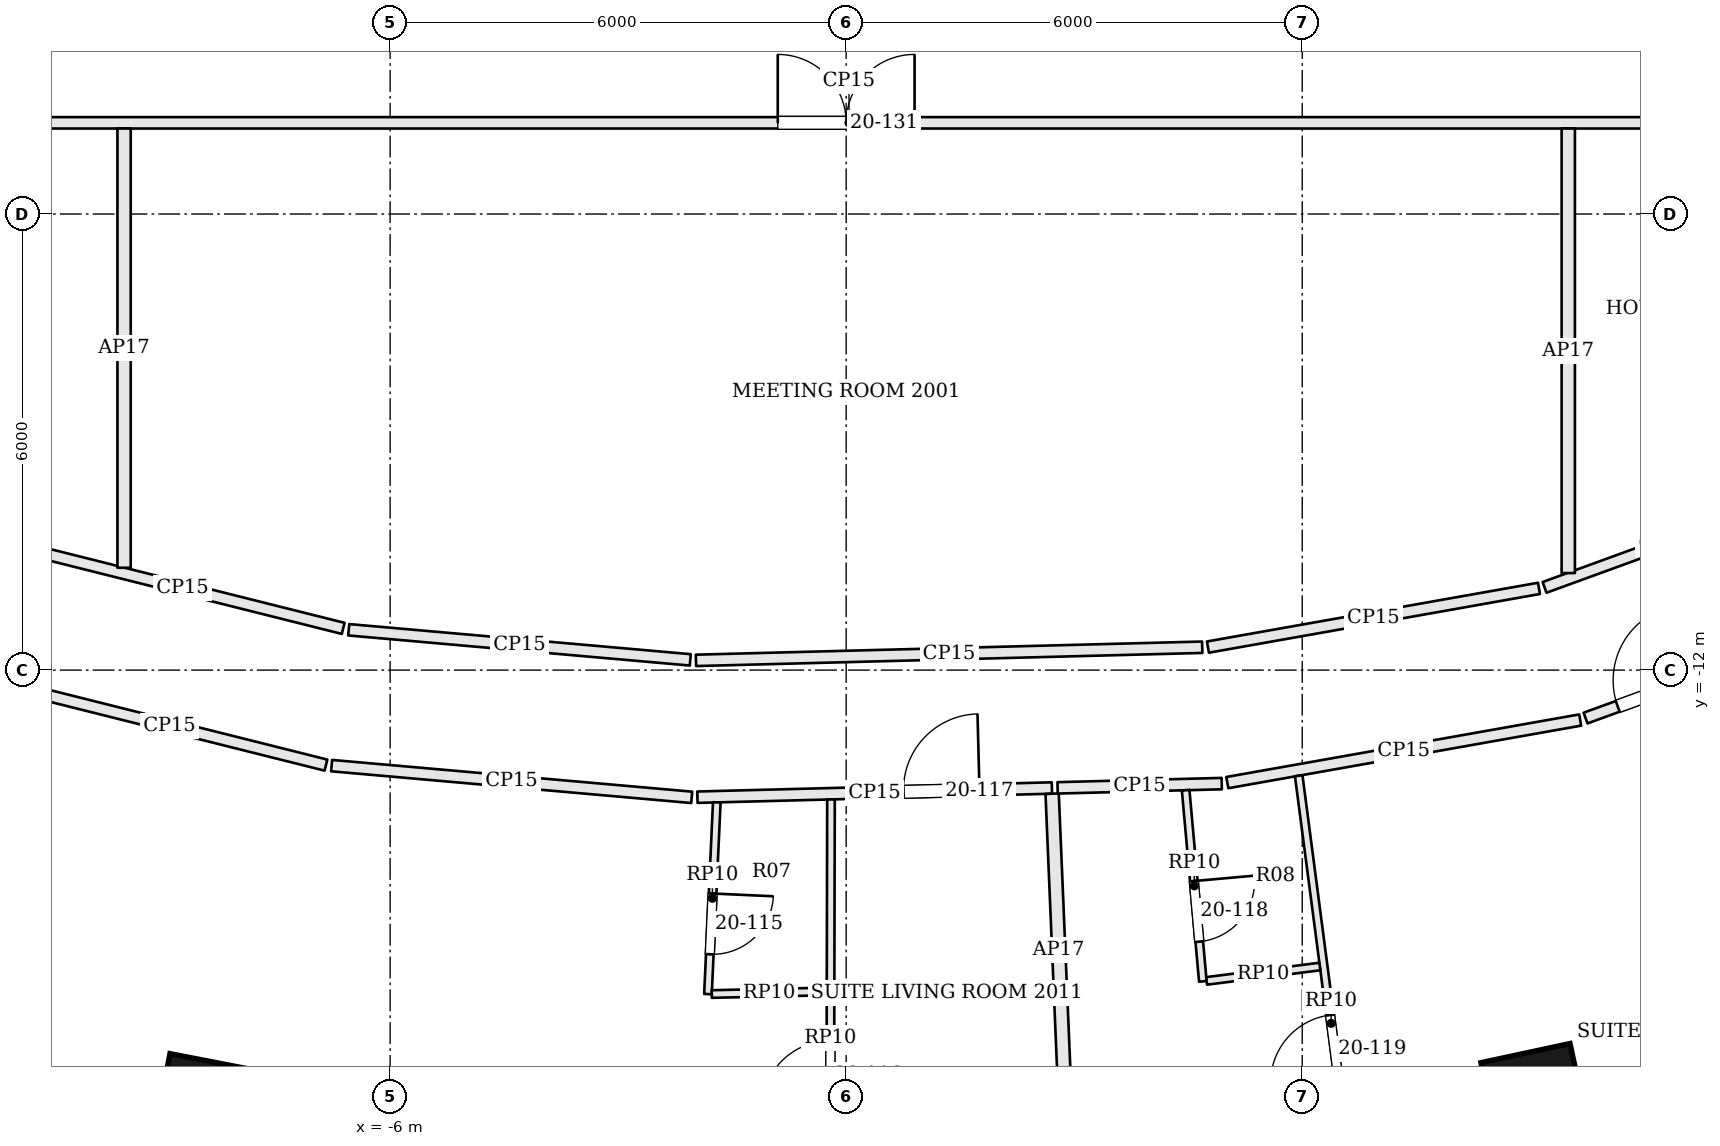
"""IFC4 building model, lengths in metres.
Left out: names, types, materials, properties, quantities, classifications, styles, units other than length and angle.
Written with IfcOpenShell. Run it as: python <this file> out.ifc"""

import sys

from ifc_helpers import new_model, si_unit, direction, frame, frame_2d, origin, origin_2d, place, context, subcontext, project, spatial, rectangle, extrude, element, fill, save


model = new_model("IFC4")
c1 = context("Model", 3, precision=1e-05, world=origin(), true_north=direction((0.0, 1.0)))
c2 = subcontext(c1, "Body", "Model", "MODEL_VIEW")
j1 = project(units=[si_unit("LENGTHUNIT", "METRE"), si_unit("PLANEANGLEUNIT", "RADIAN")], contexts=[c1])
p1 = place(None, origin())
s1 = spatial("IfcSite", under=j1, at=p1, CompositionType="ELEMENT")
p2 = place(p1, origin())
s2 = spatial("IfcBuilding", under=s1, at=p2, CompositionType="ELEMENT")
p3 = place(p2, frame((0.0, 0.0, 88.8)))
s3 = spatial("IfcBuildingStorey", under=s2, at=p3, CompositionType="ELEMENT", Elevation=88.8)
for number, where, z_axis, x_axis in (
    (1, (-8.422, -17.749, 0.0), (0.0, 0.0, 1.0), (0.982, -0.191, 0.0)),
    (2, (9.063, -17.625, 0.0), (0.0, 0.0, 1.0), (0.978, 0.21, 0.0)),
):
    element("IfcColumn", number, at=place(p3, frame(where, z_axis=z_axis, x_axis=x_axis)), inside=s3, PredefinedType="COLUMN", context=c2, shape_type="SweptSolid", body=[
        extrude(rectangle(XDim=1.2, YDim=1.2, at=origin_2d()), origin(), (0.0, 0.0, 1.0), 3.6),
    ])
p4 = place(p3, frame((-10.961, -12.218, 0.0), z_axis=(0.0, 0.0, 1.0), x_axis=(0.969990045386, -0.243144631551, 0.0)))
e3 = element("IfcWall", 3, at=p4, inside=s3, PredefinedType="PARTITIONING", context=c2, shape_type="SweptSolid", body=[
    extrude(rectangle(XDim=4.244, YDim=0.15, at=frame_2d((2.122, 0.0))), origin(), (0.0, 0.0, 1.0), 2.784),
])
p5 = place(p3, frame((-6.77, -13.257, 0.0), z_axis=(0.0, 0.0, 1.0), x_axis=(0.996139758015, -0.08778144737, 0.0)))
e4 = element("IfcWall", 4, at=p5, inside=s3, PredefinedType="PARTITIONING", context=c2, shape_type="SweptSolid", body=[
    extrude(rectangle(XDim=4.756, YDim=0.15, at=frame_2d((2.378, 0.0))), origin(), (0.0, 0.0, 1.0), 2.784),
])
p6 = place(p3, frame((-1.957, -13.672, 0.0), z_axis=(0.0, 0.0, 1.0), x_axis=(0.999664413823, 0.025904820691, 0.0)))
e5 = element("IfcWall", 5, at=p6, inside=s3, PredefinedType="PARTITIONING", context=c2, shape_type="SweptSolid", body=[
    extrude(rectangle(XDim=4.665, YDim=0.15, at=frame_2d((2.333, 0.0))), origin(), (0.0, 0.0, 1.0), 2.784),
])
p7 = place(p6, frame((2.712, 0.0, 0.0)))
e6 = element("IfcOpeningElement", 6, at=p7, cuts=e5, PredefinedType="OPENING", context=c2, shape_type="SweptSolid", body=[
    extrude(rectangle(XDim=1.0, YDim=2.1, at=frame_2d((0.5, 1.05))), frame((0.0, 0.085, 0.0), z_axis=(0.0, -1.0, 0.0), x_axis=(1.0, 0.0, 0.0)), (0.0, 0.0, 1.0), 0.17),
])
p8 = place(p3, frame((2.882, -17.732, 0.0), z_axis=(0.0, 0.0, 1.0), x_axis=(-0.042001196053, 0.999117560415, 0.0)))
e7 = element("IfcWall", 7, at=p8, inside=s3, PredefinedType="PARTITIONING", context=c2, shape_type="SweptSolid", body=[
    extrude(rectangle(XDim=4.11, YDim=0.175, at=frame_2d((2.055, 0.0))), origin(), (0.0, 0.0, 1.0), 2.784),
])
p9 = place(p3, frame((2.781, -13.549, 0.0), z_axis=(0.0, 0.0, 1.0), x_axis=(0.999665013714, 0.025881660615, 0.0)))
e8 = element("IfcWall", 8, at=p9, inside=s3, PredefinedType="PARTITIONING", context=c2, shape_type="SweptSolid", body=[
    extrude(rectangle(XDim=2.16, YDim=0.15, at=frame_2d((1.08, 0.0))), origin(), (0.0, 0.0, 1.0), 2.784),
])
p10 = place(p3, frame((5.015, -13.48, 0.0), z_axis=(0.0, 0.0, 1.0), x_axis=(0.984637772103, 0.174609443467, 0.0)))
e9 = element("IfcWall", 9, at=p10, inside=s3, PredefinedType="PARTITIONING", context=c2, shape_type="SweptSolid", body=[
    extrude(rectangle(XDim=4.715, YDim=0.15, at=frame_2d((2.357, 0.0))), origin(), (0.0, 0.0, 1.0), 2.784),
])
p11 = place(p3, frame((9.728, -12.631, 0.0), z_axis=(0.0, 0.0, 1.0), x_axis=(0.939626438181, 0.342201923826, 0.0)))
e10 = element("IfcWall", 10, at=p11, inside=s3, PredefinedType="PARTITIONING", context=c2, shape_type="SweptSolid", body=[
    extrude(rectangle(XDim=3.716, YDim=0.15, at=frame_2d((1.858, 0.0))), origin(), (0.0, 0.0, 1.0), 2.784),
])
p12 = place(p11, frame((0.45, 0.0, 0.0)))
e11 = element("IfcOpeningElement", 11, at=p12, cuts=e10, PredefinedType="OPENING", context=c2, shape_type="SweptSolid", body=[
    extrude(rectangle(XDim=1.0, YDim=2.1, at=frame_2d((0.5, 1.05))), frame((0.0, 0.085, 0.0), z_axis=(0.0, -1.0, 0.0), x_axis=(1.0, 0.0, 0.0)), (0.0, 0.0, 1.0), 0.17),
])
p13 = place(p3, frame((12.353, -9.76, 0.0), z_axis=(0.0, 0.0, 1.0), x_axis=(-0.939632450309, -0.342185415127, 0.0)))
e12 = element("IfcWall", 12, at=p13, inside=s3, PredefinedType="PARTITIONING", context=c2, shape_type="SweptSolid", body=[
    extrude(rectangle(XDim=3.368, YDim=0.15, at=frame_2d((1.684, 0.0))), origin(), (0.0, 0.0, 1.0), 2.784),
])
p14 = place(p3, frame((9.115, -10.925, 0.0), z_axis=(0.0, 0.0, 1.0), x_axis=(-0.984632605417, -0.174638576352, 0.0)))
e13 = element("IfcWall", 13, at=p14, inside=s3, PredefinedType="PARTITIONING", context=c2, shape_type="SweptSolid", body=[
    extrude(rectangle(XDim=4.423, YDim=0.15, at=frame_2d((2.211, 0.0))), origin(), (0.0, 0.0, 1.0), 2.784),
])
p15 = place(p3, frame((4.684, -11.699, 0.0), z_axis=(0.0, 0.0, 1.0), x_axis=(-0.999663438204, -0.025942442425, 0.0)))
e14 = element("IfcWall", 14, at=p15, inside=s3, PredefinedType="PARTITIONING", context=c2, shape_type="SweptSolid", body=[
    extrude(rectangle(XDim=6.663, YDim=0.15, at=frame_2d((3.332, 0.0))), origin(), (0.0, 0.0, 1.0), 2.784),
])
p16 = place(p3, frame((-2.051, -11.865, 0.0), z_axis=(0.0, 0.0, 1.0), x_axis=(-0.996139599493, 0.087783246245, 0.0)))
e15 = element("IfcWall", 15, at=p16, inside=s3, PredefinedType="PARTITIONING", context=c2, shape_type="SweptSolid", body=[
    extrude(rectangle(XDim=4.511, YDim=0.15, at=frame_2d((2.255, 0.0))), origin(), (0.0, 0.0, 1.0), 2.784),
])
p17 = place(p3, frame((-6.617, -11.451, 0.0), z_axis=(0.0, 0.0, 1.0), x_axis=(-0.969987441267, 0.243155020069, 0.0)))
e16 = element("IfcWall", 16, at=p17, inside=s3, PredefinedType="PARTITIONING", context=c2, shape_type="SweptSolid", body=[
    extrude(rectangle(XDim=4.359, YDim=0.15, at=frame_2d((2.179, 0.0))), origin(), (0.0, 0.0, 1.0), 2.784),
])
p18 = place(p3, frame((-14.725, -4.8, 0.0), z_axis=(0.0, 0.0, 1.0), x_axis=(1.0, 0.0, 0.0)))
e17 = element("IfcWall", 17, at=p18, inside=s3, PredefinedType="PARTITIONING", context=c2, shape_type="SweptSolid", body=[
    extrude(rectangle(XDim=29.525, YDim=0.15, at=frame_2d((14.763, 0.0))), origin(), (0.0, 0.0, 1.0), 2.784),
])
p19 = place(p18, frame((2.075, 0.0, 0.0)))
e18 = element("IfcOpeningElement", 18, at=p19, cuts=e17, PredefinedType="OPENING", context=c2, shape_type="SweptSolid", body=[
    extrude(rectangle(XDim=1.0, YDim=2.1, at=frame_2d((0.5, 1.05))), frame((0.0, 0.085, 0.0), z_axis=(0.0, -1.0, 0.0), x_axis=(1.0, 0.0, 0.0)), (0.0, 0.0, 1.0), 0.17),
])
p20 = place(p18, frame((13.825, 0.0, 0.0)))
e19 = element("IfcOpeningElement", 19, at=p20, cuts=e17, PredefinedType="OPENING", context=c2, shape_type="SweptSolid", body=[
    extrude(rectangle(XDim=1.8, YDim=2.1, at=frame_2d((0.9, 1.05))), frame((0.0, 0.085, 0.0), z_axis=(0.0, -1.0, 0.0), x_axis=(1.0, 0.0, 0.0)), (0.0, 0.0, 1.0), 0.17),
])
p21 = place(p18, frame((26.525, 0.0, 0.0)))
e20 = element("IfcOpeningElement", 20, at=p21, cuts=e17, PredefinedType="OPENING", context=c2, shape_type="SweptSolid", body=[
    extrude(rectangle(XDim=0.7, YDim=2.1, at=frame_2d((0.35, 1.05))), frame((0.0, 0.085, 0.0), z_axis=(0.0, -1.0, 0.0), x_axis=(1.0, 0.0, 0.0)), (0.0, 0.0, 1.0), 0.17),
])
p22 = place(p3, frame((-0.214, -19.979, 0.0), z_axis=(0.0, 0.0, 1.0), x_axis=(0.002333625165, 0.999997277093, 0.0)))
e21 = element("IfcWall", 21, at=p22, inside=s3, PredefinedType="PARTITIONING", context=c2, shape_type="SweptSolid", body=[
    extrude(rectangle(XDim=6.277, YDim=0.1, at=frame_2d((3.139, 0.0))), origin(), (0.0, 0.0, 1.0), 2.884),
])
p23 = place(p22, frame((2.202, 0.0, 0.0)))
e22 = element("IfcOpeningElement", 22, at=p23, cuts=e21, PredefinedType="OPENING", context=c2, shape_type="SweptSolid", body=[
    extrude(rectangle(XDim=0.9, YDim=2.4, at=frame_2d((0.45, 1.2))), frame((0.0, 0.06, 0.0), z_axis=(0.0, -1.0, 0.0), x_axis=(1.0, 0.0, 0.0)), (0.0, 0.0, 1.0), 0.12),
])
p24 = place(p3, frame((-1.702, -13.74, 0.0), z_axis=(0.0, 0.0, 1.0), x_axis=(-0.045833111847, -0.998949110745, 0.0)))
e23 = element("IfcWall", 23, at=p24, inside=s3, PredefinedType="PARTITIONING", context=c2, shape_type="SweptSolid", body=[
    extrude(rectangle(XDim=2.525, YDim=0.1, at=frame_2d((1.262, 0.0))), origin(), (0.0, 0.0, 1.0), 2.884),
])
p25 = place(p24, frame((1.2, 0.0, 0.0)))
e24 = element("IfcOpeningElement", 24, at=p25, cuts=e23, PredefinedType="OPENING", context=c2, shape_type="SweptSolid", body=[
    extrude(rectangle(XDim=0.8, YDim=2.1, at=frame_2d((0.4, 1.05))), frame((0.0, 0.06, 0.0), z_axis=(0.0, -1.0, 0.0), x_axis=(1.0, 0.0, 0.0)), (0.0, 0.0, 1.0), 0.12),
])
p26 = place(p3, frame((-1.768, -16.262, 0.0), z_axis=(0.0, 0.0, 1.0), x_axis=(0.999748456617, 0.022428185195, 0.0)))
e25 = element("IfcWall", 25, at=p26, inside=s3, PredefinedType="PARTITIONING", context=c2, shape_type="SweptSolid", body=[
    extrude(rectangle(XDim=1.513, YDim=0.1, at=frame_2d((0.757, 0.0))), origin(), (0.0, 0.0, 1.0), 2.884),
])
p27 = place(p3, frame((6.807, -19.905, 0.0), z_axis=(0.0, 0.0, 1.0), x_axis=(-0.129895112789, 0.991527740244, 0.0)))
e26 = element("IfcWall", 26, at=p27, inside=s3, PredefinedType="PARTITIONING", context=c2, shape_type="SweptSolid", body=[
    extrude(rectangle(XDim=6.571, YDim=0.1, at=frame_2d((3.285, 0.0))), origin(), (0.0, 0.0, 1.0), 2.884),
])
p28 = place(p27, frame((2.496, 0.0, 0.0)))
e27 = element("IfcOpeningElement", 27, at=p28, cuts=e26, PredefinedType="OPENING", context=c2, shape_type="SweptSolid", body=[
    extrude(rectangle(XDim=0.9, YDim=2.4, at=frame_2d((0.45, 1.2))), frame((0.0, 0.06, 0.0), z_axis=(0.0, -1.0, 0.0), x_axis=(1.0, 0.0, 0.0)), (0.0, 0.0, 1.0), 0.12),
])
p29 = place(p3, frame((4.466, -13.581, 0.0), z_axis=(0.0, 0.0, 1.0), x_axis=(0.089541778651, -0.995983067063, 0.0)))
e28 = element("IfcWall", 28, at=p29, inside=s3, PredefinedType="PARTITIONING", context=c2, shape_type="SweptSolid", body=[
    extrude(rectangle(XDim=2.525, YDim=0.1, at=frame_2d((1.262, 0.0))), origin(), (0.0, 0.0, 1.0), 2.884),
])
p30 = place(p29, frame((1.2, 0.0, 0.0)))
e29 = element("IfcOpeningElement", 29, at=p30, cuts=e28, PredefinedType="OPENING", context=c2, shape_type="SweptSolid", body=[
    extrude(rectangle(XDim=0.8, YDim=2.1, at=frame_2d((0.4, 1.05))), frame((0.0, 0.06, 0.0), z_axis=(0.0, -1.0, 0.0), x_axis=(1.0, 0.0, 0.0)), (0.0, 0.0, 1.0), 0.12),
])
p31 = place(p3, frame((4.742, -16.089, 0.0), z_axis=(0.0, 0.0, 1.0), x_axis=(0.992013080374, 0.126135040205, 0.0)))
e30 = element("IfcWall", 30, at=p31, inside=s3, PredefinedType="PARTITIONING", context=c2, shape_type="SweptSolid", body=[
    extrude(rectangle(XDim=1.502, YDim=0.1, at=frame_2d((0.751, 0.0))), origin(), (0.0, 0.0, 1.0), 2.884),
])
p32 = place(p3, frame((-9.5, -10.654, 0.0), z_axis=(0.0, 0.0, 1.0), x_axis=(0.0, 1.0, 0.0)))
e31 = element("IfcWall", 31, at=p32, inside=s3, PredefinedType="PARTITIONING", context=c2, shape_type="SweptSolid", body=[
    extrude(rectangle(XDim=5.779, YDim=0.175, at=frame_2d((2.889, 0.0))), origin(), (0.0, 0.0, 1.0), 2.784),
])
p33 = place(p3, frame((9.5, -10.723, 0.0), z_axis=(0.0, 0.0, 1.0), x_axis=(0.0, 1.0, 0.0)))
e32 = element("IfcWall", 32, at=p33, inside=s3, PredefinedType="PARTITIONING", context=c2, shape_type="SweptSolid", body=[
    extrude(rectangle(XDim=5.848, YDim=0.175, at=frame_2d((2.924, 0.0))), origin(), (0.0, 0.0, 1.0), 2.784),
])
p34 = place(p25, origin())
e33 = element("IfcDoor", 33, at=p34, inside=s3, OperationType="SINGLE_SWING_LEFT", PredefinedType="DOOR", context=c2, shape_type="SweptSolid", body=[
    extrude(rectangle(XDim=0.8, YDim=2.1, at=frame_2d((0.4, 1.05))), frame((0.0, 0.025, 0.0), z_axis=(0.0, -1.0, 0.0), x_axis=(1.0, 0.0, 0.0)), (0.0, 0.0, 1.0), 0.05),
])
fill(e24, e33)
p35 = place(p23, origin())
e34 = element("IfcDoor", 34, at=p35, inside=s3, OperationType="SINGLE_SWING_LEFT", PredefinedType="DOOR", context=c2, shape_type="SweptSolid", body=[
    extrude(rectangle(XDim=0.9, YDim=2.4, at=frame_2d((0.45, 1.2))), frame((0.0, 0.025, 0.0), z_axis=(0.0, -1.0, 0.0), x_axis=(1.0, 0.0, 0.0)), (0.0, 0.0, 1.0), 0.05),
])
fill(e22, e34)
p36 = place(p7, origin())
e35 = element("IfcDoor", 35, at=p36, inside=s3, OperationType="SINGLE_SWING_RIGHT", PredefinedType="DOOR", context=c2, shape_type="SweptSolid", body=[
    extrude(rectangle(XDim=1.0, YDim=2.1, at=frame_2d((0.5, 1.05))), frame((0.0, 0.025, 0.0), z_axis=(0.0, -1.0, 0.0), x_axis=(1.0, 0.0, 0.0)), (0.0, 0.0, 1.0), 0.05),
])
fill(e6, e35)
p37 = place(p30, origin())
e36 = element("IfcDoor", 36, at=p37, inside=s3, OperationType="SINGLE_SWING_LEFT", PredefinedType="DOOR", context=c2, shape_type="SweptSolid", body=[
    extrude(rectangle(XDim=0.8, YDim=2.1, at=frame_2d((0.4, 1.05))), frame((0.0, 0.025, 0.0), z_axis=(0.0, -1.0, 0.0), x_axis=(1.0, 0.0, 0.0)), (0.0, 0.0, 1.0), 0.05),
])
fill(e29, e36)
p38 = place(p28, origin())
e37 = element("IfcDoor", 37, at=p38, inside=s3, OperationType="SINGLE_SWING_LEFT", PredefinedType="DOOR", context=c2, shape_type="SweptSolid", body=[
    extrude(rectangle(XDim=0.9, YDim=2.4, at=frame_2d((0.45, 1.2))), frame((0.0, 0.025, 0.0), z_axis=(0.0, -1.0, 0.0), x_axis=(1.0, 0.0, 0.0)), (0.0, 0.0, 1.0), 0.05),
])
fill(e27, e37)
p39 = place(p12, origin())
e38 = element("IfcDoor", 38, at=p39, inside=s3, OperationType="SINGLE_SWING_RIGHT", PredefinedType="DOOR", context=c2, shape_type="SweptSolid", body=[
    extrude(rectangle(XDim=1.0, YDim=2.1, at=frame_2d((0.5, 1.05))), frame((0.0, 0.025, 0.0), z_axis=(0.0, -1.0, 0.0), x_axis=(1.0, 0.0, 0.0)), (0.0, 0.0, 1.0), 0.05),
])
fill(e11, e38)
p40 = place(p20, origin())
e39 = element("IfcDoor", 39, at=p40, inside=s3, OperationType="DOUBLE_DOOR_SINGLE_SWING", PredefinedType="DOOR", context=c2, shape_type="SweptSolid", body=[
    extrude(rectangle(XDim=1.8, YDim=2.1, at=frame_2d((0.9, 1.05))), frame((0.0, 0.025, 0.0), z_axis=(0.0, -1.0, 0.0), x_axis=(1.0, 0.0, 0.0)), (0.0, 0.0, 1.0), 0.05),
])
fill(e19, e39)
save(model, sys.argv[1])
